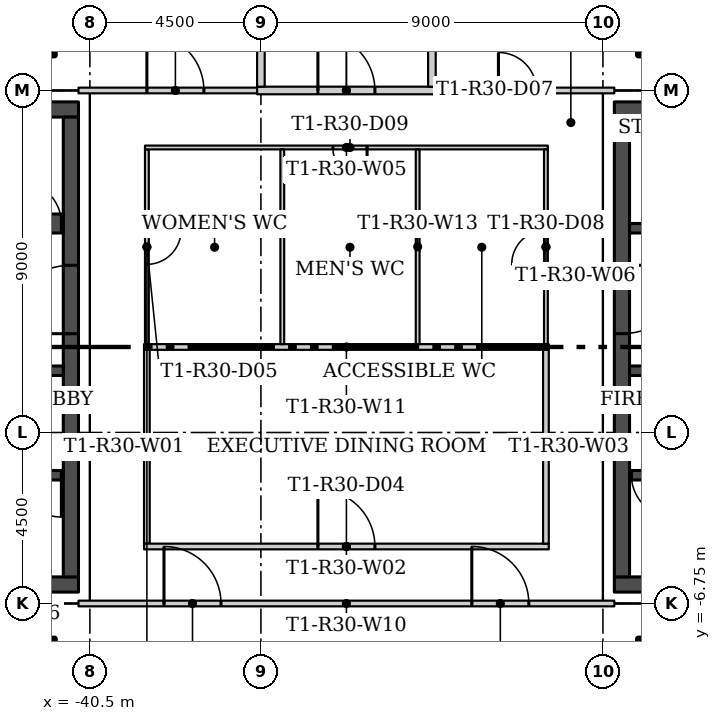
"""IFC4 building model, lengths in metres.
Left out: names, types, materials, properties, quantities, classifications, styles, units other than length and angle.
Written with IfcOpenShell. Run it as: python <this file> out.ifc"""

import sys

from ifc_helpers import new_model, si_unit, direction, frame, frame_2d, origin, origin_2d, place, context, subcontext, project, spatial, rectangle, hollow_rectangle, extrude, element, fill, save


model = new_model("IFC4")
c1 = context("Model", 3, precision=1e-05, world=origin(), true_north=direction((0.0, 1.0)))
c2 = subcontext(c1, "Body", "Model", "MODEL_VIEW")
j1 = project(units=[si_unit("LENGTHUNIT", "METRE"), si_unit("PLANEANGLEUNIT", "RADIAN")], contexts=[c1])
p1 = place(None, origin())
s1 = spatial("IfcSite", under=j1, at=p1, CompositionType="ELEMENT")
p2 = place(p1, origin())
s2 = spatial("IfcBuilding", under=s1, at=p2, CompositionType="ELEMENT")
p3 = place(p2, frame((0.0, 0.0, 269.4)))
s3 = spatial("IfcBuildingStorey", under=s2, at=p3, CompositionType="ELEMENT", Elevation=269.4)
for number, where in (
    (1, (-25.625, 8.125, 0.0)),
    (2, (-25.625, -8.125, 0.0)),
    (3, (-41.875, 8.125, 0.0)),
    (4, (-41.875, -8.125, 0.0)),
):
    element("IfcColumn", number, at=place(p3, frame(where)), inside=s3, PredefinedType="COLUMN", context=c2, shape_type="SweptSolid", body=[
        extrude(hollow_rectangle(XDim=0.9, YDim=0.9, WallThickness=0.036, at=origin_2d()), origin(), (0.0, 0.0, 1.0), 3.45),
    ])
p4 = place(p3, frame((-39.0, -0.075, 0.0), z_axis=(0.0, 0.0, 1.0), x_axis=(0.0, -1.0, 0.0)))
e5 = element("IfcWall", 5, at=p4, inside=s3, PredefinedType="PARTITIONING", context=c2, shape_type="SweptSolid", body=[
    extrude(rectangle(XDim=5.1, YDim=0.15, at=frame_2d((2.55, 0.0))), origin(), (0.0, 0.0, 1.0), 3.45),
])
p5 = place(p3, frame((-39.075, -5.25, 0.0)))
e6 = element("IfcWall", 6, at=p5, inside=s3, PredefinedType="PARTITIONING", context=c2, shape_type="SweptSolid", body=[
    extrude(rectangle(XDim=10.65, YDim=0.15, at=frame_2d((5.325, 0.0))), origin(), (0.0, 0.0, 1.0), 3.45),
])
p6 = place(p5, frame((4.575, 0.0, 0.0)))
e7 = element("IfcOpeningElement", 7, at=p6, cuts=e6, PredefinedType="OPENING", context=c2, shape_type="SweptSolid", body=[
    extrude(rectangle(XDim=1.5, YDim=2.1, at=frame_2d((0.75, 1.05))), frame((0.0, 0.085, 0.0), z_axis=(0.0, -1.0, 0.0), x_axis=(1.0, 0.0, 0.0)), (0.0, 0.0, 1.0), 0.17),
])
p7 = place(p3, frame((-28.5, -5.175, 0.0), z_axis=(0.0, 0.0, 1.0), x_axis=(0.0, 1.0, 0.0)))
e8 = element("IfcWall", 8, at=p7, inside=s3, PredefinedType="PARTITIONING", context=c2, shape_type="SweptSolid", body=[
    extrude(rectangle(XDim=5.1, YDim=0.15, at=frame_2d((2.55, 0.0))), origin(), (0.0, 0.0, 1.0), 3.45),
])
p8 = place(p3, frame((-39.0, 5.2, 0.0), z_axis=(0.0, 0.0, 1.0), x_axis=(0.0, -1.0, 0.0)))
e9 = element("IfcWall", 9, at=p8, inside=s3, PredefinedType="PARTITIONING", context=c2, shape_type="SweptSolid", body=[
    extrude(rectangle(XDim=5.125, YDim=0.1, at=frame_2d((2.562, 0.0))), origin(), (0.0, 0.0, 1.0), 3.45),
])
p9 = place(p8, frame((2.125, 0.0, 0.0)))
e10 = element("IfcOpeningElement", 10, at=p9, cuts=e9, PredefinedType="OPENING", context=c2, shape_type="SweptSolid", body=[
    extrude(rectangle(XDim=0.9, YDim=2.1, at=frame_2d((0.45, 1.05))), frame((0.0, 0.06, 0.0), z_axis=(0.0, -1.0, 0.0), x_axis=(1.0, 0.0, 0.0)), (0.0, 0.0, 1.0), 0.12),
])
p10 = place(p3, frame((-28.45, 5.25, 0.0), z_axis=(0.0, 0.0, 1.0), x_axis=(-1.0, 0.0, 0.0)))
e11 = element("IfcWall", 11, at=p10, inside=s3, PredefinedType="PARTITIONING", context=c2, shape_type="SweptSolid", body=[
    extrude(rectangle(XDim=10.6, YDim=0.1, at=frame_2d((5.3, 0.0))), origin(), (0.0, 0.0, 1.0), 3.45),
])
p11 = place(p10, frame((4.756, 0.0, 0.0)))
e12 = element("IfcOpeningElement", 12, at=p11, cuts=e11, PredefinedType="OPENING", context=c2, shape_type="SweptSolid", body=[
    extrude(rectangle(XDim=0.9, YDim=2.1, at=frame_2d((0.45, 1.05))), frame((0.0, 0.06, 0.0), z_axis=(0.0, -1.0, 0.0), x_axis=(1.0, 0.0, 0.0)), (0.0, 0.0, 1.0), 0.12),
])
p12 = place(p3, frame((-28.5, 0.075, 0.0), z_axis=(0.0, 0.0, 1.0), x_axis=(0.0, 1.0, 0.0)))
e13 = element("IfcWall", 13, at=p12, inside=s3, PredefinedType="PARTITIONING", context=c2, shape_type="SweptSolid", body=[
    extrude(rectangle(XDim=5.125, YDim=0.1, at=frame_2d((2.562, 0.0))), origin(), (0.0, 0.0, 1.0), 3.45),
])
p13 = place(p12, frame((2.1, 0.0, 0.0)))
e14 = element("IfcOpeningElement", 14, at=p13, cuts=e13, PredefinedType="OPENING", context=c2, shape_type="SweptSolid", body=[
    extrude(rectangle(XDim=0.9, YDim=2.1, at=frame_2d((0.45, 1.05))), frame((0.0, 0.06, 0.0), z_axis=(0.0, -1.0, 0.0), x_axis=(1.0, 0.0, 0.0)), (0.0, 0.0, 1.0), 0.12),
])
p14 = place(p3, frame((-40.8, 6.75, 0.0)))
e15 = element("IfcWall", 15, at=p14, inside=s3, PredefinedType="PARTITIONING", context=c2, shape_type="SweptSolid", body=[
    extrude(rectangle(XDim=4.9, YDim=0.15, at=frame_2d((2.45, 0.0))), origin(), (0.0, 0.0, 1.0), 3.45),
])
p15 = place(p14, frame((1.8, 0.0, 0.0)))
e16 = element("IfcOpeningElement", 16, at=p15, cuts=e15, PredefinedType="OPENING", context=c2, shape_type="SweptSolid", body=[
    extrude(rectangle(XDim=1.5, YDim=2.1, at=frame_2d((0.75, 1.05))), frame((0.0, 0.085, 0.0), z_axis=(0.0, -1.0, 0.0), x_axis=(1.0, 0.0, 0.0)), (0.0, 0.0, 1.0), 0.17),
])
p16 = place(p3, frame((-31.6, 6.75, 0.0)))
e17 = element("IfcWall", 17, at=p16, inside=s3, PredefinedType="PARTITIONING", context=c2, shape_type="SweptSolid", body=[
    extrude(rectangle(XDim=4.9, YDim=0.15, at=frame_2d((2.45, 0.0))), origin(), (0.0, 0.0, 1.0), 3.45),
])
p17 = place(p16, frame((1.85, 0.0, 0.0)))
e18 = element("IfcOpeningElement", 18, at=p17, cuts=e17, PredefinedType="OPENING", context=c2, shape_type="SweptSolid", body=[
    extrude(rectangle(XDim=1.0, YDim=2.4, at=frame_2d((0.5, 1.2))), frame((0.0, 0.085, 0.0), z_axis=(0.0, -1.0, 0.0), x_axis=(1.0, 0.0, 0.0)), (0.0, 0.0, 1.0), 0.17),
])
p18 = place(p3, frame((-36.1, 6.75, 0.0)))
e19 = element("IfcWall", 19, at=p18, inside=s3, PredefinedType="PARTITIONING", context=c2, shape_type="SweptSolid", body=[
    extrude(rectangle(XDim=4.7, YDim=0.2, at=frame_2d((2.35, 0.0))), origin(), (0.0, 0.0, 1.0), 3.45),
])
p19 = place(p18, frame((1.6, 0.0, 0.0)))
e20 = element("IfcOpeningElement", 20, at=p19, cuts=e19, PredefinedType="OPENING", context=c2, shape_type="SweptSolid", body=[
    extrude(rectangle(XDim=1.5, YDim=2.4, at=frame_2d((0.75, 1.2))), frame((0.0, 0.11, 0.0), z_axis=(0.0, -1.0, 0.0), x_axis=(1.0, 0.0, 0.0)), (0.0, 0.0, 1.0), 0.22),
])
p20 = place(p3, frame((-40.8, -6.75, 0.0)))
e21 = element("IfcWall", 21, at=p20, inside=s3, PredefinedType="PARTITIONING", context=c2, shape_type="SweptSolid", body=[
    extrude(rectangle(XDim=14.1, YDim=0.15, at=frame_2d((7.05, 0.0))), origin(), (0.0, 0.0, 1.0), 3.45),
])
p21 = place(p20, frame((2.25, 0.0, 0.0)))
e22 = element("IfcOpeningElement", 22, at=p21, cuts=e21, PredefinedType="OPENING", context=c2, shape_type="SweptSolid", body=[
    extrude(rectangle(XDim=1.5, YDim=2.1, at=frame_2d((0.75, 1.05))), frame((0.0, 0.085, 0.0), z_axis=(0.0, -1.0, 0.0), x_axis=(1.0, 0.0, 0.0)), (0.0, 0.0, 1.0), 0.17),
])
p22 = place(p20, frame((10.35, 0.0, 0.0)))
e23 = element("IfcOpeningElement", 23, at=p22, cuts=e21, PredefinedType="OPENING", context=c2, shape_type="SweptSolid", body=[
    extrude(rectangle(XDim=1.5, YDim=2.1, at=frame_2d((0.75, 1.05))), frame((0.0, 0.085, 0.0), z_axis=(0.0, -1.0, 0.0), x_axis=(1.0, 0.0, 0.0)), (0.0, 0.0, 1.0), 0.17),
])
p23 = place(p3, frame((-28.425, 0.0, 0.0), z_axis=(0.0, 0.0, 1.0), x_axis=(-1.0, 0.0, 0.0)))
e24 = element("IfcWall", 24, at=p23, inside=s3, PredefinedType="PARTITIONING", context=c2, shape_type="SweptSolid", body=[
    extrude(rectangle(XDim=10.65, YDim=0.15, at=frame_2d((5.325, 0.0))), origin(), (0.0, 0.0, 1.0), 3.45),
])
for number, where, z_axis, x_axis in (
    (25, (-35.438, 0.075, 0.0), (0.0, 0.0, 1.0), (0.0, 1.0, 0.0)),
    (26, (-31.875, 0.075, 0.0), (0.0, 0.0, 1.0), (0.0, 1.0, 0.0)),
):
    element("IfcWall", number, at=place(p3, frame(where, z_axis=z_axis, x_axis=x_axis)), inside=s3, PredefinedType="PARTITIONING", context=c2, shape_type="SweptSolid", body=[
        extrude(rectangle(XDim=5.125, YDim=0.1, at=frame_2d((2.562, 0.0))), origin(), (0.0, 0.0, 1.0), 3.45),
    ])
for number, where, z_axis, x_axis in (
    (27, (-36.0, 6.85, 0.0), (0.0, 0.0, 1.0), (0.0, 1.0, 0.0)),
    (28, (-31.5, 6.85, 0.0), (0.0, 0.0, 1.0), (0.0, 1.0, 0.0)),
):
    element("IfcWall", number, at=place(p3, frame(where, z_axis=z_axis, x_axis=x_axis)), inside=s3, PredefinedType="PARTITIONING", context=c2, shape_type="SweptSolid", body=[
        extrude(rectangle(XDim=8.805, YDim=0.2, at=frame_2d((4.402, 0.0))), origin(), (0.0, 0.0, 1.0), 3.45),
    ])
for number, where in (
    (29, (-26.7, -6.25, 0.0)),
    (30, (-26.7, 6.25, 0.0)),
):
    element("IfcWall", number, at=place(p3, frame(where)), inside=s3, PredefinedType="SHEAR", context=c2, shape_type="SweptSolid", body=[
        extrude(rectangle(XDim=12.9, YDim=0.4, at=frame_2d((6.45, 0.0))), origin(), (0.0, 0.0, 1.0), 3.45),
    ])
p24 = place(p3, frame((-26.5, 6.05, 0.0), z_axis=(0.0, 0.0, 1.0), x_axis=(0.0, -1.0, 0.0)))
e31 = element("IfcWall", 31, at=p24, inside=s3, PredefinedType="SHEAR", context=c2, shape_type="SweptSolid", body=[
    extrude(rectangle(XDim=12.1, YDim=0.4, at=frame_2d((6.05, 0.0))), origin(), (0.0, 0.0, 1.0), 3.45),
])
p25 = place(p24, frame((3.9, 0.0, 0.0)))
e32 = element("IfcOpeningElement", 32, at=p25, cuts=e31, PredefinedType="OPENING", context=c2, shape_type="SweptSolid", body=[
    extrude(rectangle(XDim=1.8, YDim=2.4, at=frame_2d((0.9, 1.2))), frame((0.0, 0.21, 0.0), z_axis=(0.0, -1.0, 0.0), x_axis=(1.0, 0.0, 0.0)), (0.0, 0.0, 1.0), 0.42),
])
p26 = place(p3, frame((-14.2, -3.375, 0.0), z_axis=(0.0, 0.0, 1.0), x_axis=(-1.0, 0.0, 0.0)))
e33 = element("IfcWall", 33, at=p26, inside=s3, PredefinedType="SHEAR", context=c2, shape_type="SweptSolid", body=[
    extrude(rectangle(XDim=12.1, YDim=0.25, at=frame_2d((6.05, 0.0))), origin(), (0.0, 0.0, 1.0), 3.45),
])
p27 = place(p26, frame((10.95, 0.0, 0.0)))
e34 = element("IfcOpeningElement", 34, at=p27, cuts=e33, PredefinedType="OPENING", context=c2, shape_type="SweptSolid", body=[
    extrude(rectangle(XDim=1.1, YDim=2.1, at=frame_2d((0.55, 1.05))), frame((0.0, 0.135, 0.0), z_axis=(0.0, -1.0, 0.0), x_axis=(1.0, 0.0, 0.0)), (0.0, 0.0, 1.0), 0.27),
])
p28 = place(p3, frame((-14.2, -0.625, 0.0), z_axis=(0.0, 0.0, 1.0), x_axis=(-1.0, 0.0, 0.0)))
e35 = element("IfcWall", 35, at=p28, inside=s3, PredefinedType="SHEAR", context=c2, shape_type="SweptSolid", body=[
    extrude(rectangle(XDim=12.1, YDim=0.25, at=frame_2d((6.05, 0.0))), origin(), (0.0, 0.0, 1.0), 3.45),
])
p29 = place(p28, frame((8.65, 0.0, 0.0)))
e36 = element("IfcOpeningElement", 36, at=p29, cuts=e35, PredefinedType="OPENING", context=c2, shape_type="SweptSolid", body=[
    extrude(rectangle(XDim=1.2, YDim=2.1, at=frame_2d((0.6, 1.05))), frame((0.0, 0.135, 0.0), z_axis=(0.0, -1.0, 0.0), x_axis=(1.0, 0.0, 0.0)), (0.0, 0.0, 1.0), 0.27),
])
p30 = place(p28, frame((1.7, 0.0, 0.0)))
e37 = element("IfcOpeningElement", 37, at=p30, cuts=e35, PredefinedType="OPENING", context=c2, shape_type="SweptSolid", body=[
    extrude(rectangle(XDim=0.9, YDim=2.1, at=frame_2d((0.45, 1.05))), frame((0.0, 0.135, 0.0), z_axis=(0.0, -1.0, 0.0), x_axis=(1.0, 0.0, 0.0)), (0.0, 0.0, 1.0), 0.27),
])
p31 = place(p28, frame((0.075, 0.0, 0.0)))
e38 = element("IfcOpeningElement", 38, at=p31, cuts=e35, PredefinedType="OPENING", context=c2, shape_type="SweptSolid", body=[
    extrude(rectangle(XDim=0.9, YDim=2.1, at=frame_2d((0.45, 1.05))), frame((0.0, 0.135, 0.0), z_axis=(0.0, -1.0, 0.0), x_axis=(1.0, 0.0, 0.0)), (0.0, 0.0, 1.0), 0.27),
])
p32 = place(p3, frame((-26.3, 3.125, 0.0)))
e39 = element("IfcWall", 39, at=p32, inside=s3, PredefinedType="SHEAR", context=c2, shape_type="SweptSolid", body=[
    extrude(rectangle(XDim=12.1, YDim=0.25, at=frame_2d((6.05, 0.0))), origin(), (0.0, 0.0, 1.0), 3.45),
])
p33 = place(p32, frame((6.95, 0.0, 0.0)))
e40 = element("IfcOpeningElement", 40, at=p33, cuts=e39, PredefinedType="OPENING", context=c2, shape_type="SweptSolid", body=[
    extrude(rectangle(XDim=1.1, YDim=2.1, at=frame_2d((0.55, 1.05))), frame((0.0, 0.135, 0.0), z_axis=(0.0, -1.0, 0.0), x_axis=(1.0, 0.0, 0.0)), (0.0, 0.0, 1.0), 0.27),
])
p34 = place(p32, frame((10.075, 0.0, 0.0)))
e41 = element("IfcOpeningElement", 41, at=p34, cuts=e39, PredefinedType="OPENING", context=c2, shape_type="SweptSolid", body=[
    extrude(rectangle(XDim=1.1, YDim=2.1, at=frame_2d((0.55, 1.05))), frame((0.0, 0.135, 0.0), z_axis=(0.0, -1.0, 0.0), x_axis=(1.0, 0.0, 0.0)), (0.0, 0.0, 1.0), 0.27),
])
p35 = place(p32, frame((1.55, 0.0, 0.0)))
e42 = element("IfcOpeningElement", 42, at=p35, cuts=e39, PredefinedType="OPENING", context=c2, shape_type="SweptSolid", body=[
    extrude(rectangle(XDim=0.9, YDim=2.1, at=frame_2d((0.45, 1.05))), frame((0.0, 0.135, 0.0), z_axis=(0.0, -1.0, 0.0), x_axis=(1.0, 0.0, 0.0)), (0.0, 0.0, 1.0), 0.27),
])
p36 = place(p32, frame((4.475, 0.0, 0.0)))
e43 = element("IfcOpeningElement", 43, at=p36, cuts=e39, PredefinedType="OPENING", context=c2, shape_type="SweptSolid", body=[
    extrude(rectangle(XDim=0.9, YDim=2.1, at=frame_2d((0.45, 1.05))), frame((0.0, 0.135, 0.0), z_axis=(0.0, -1.0, 0.0), x_axis=(1.0, 0.0, 0.0)), (0.0, 0.0, 1.0), 0.27),
])
for number, where, z_axis, x_axis in (
    (44, (-40.8, -6.25, 0.0), (0.0, 0.0, 1.0), (-1.0, 0.0, 0.0)),
    (45, (-40.8, 6.25, 0.0), (0.0, 0.0, 1.0), (-1.0, 0.0, 0.0)),
):
    element("IfcWall", number, at=place(p3, frame(where, z_axis=z_axis, x_axis=x_axis)), inside=s3, PredefinedType="SHEAR", context=c2, shape_type="SweptSolid", body=[
        extrude(rectangle(XDim=12.9, YDim=0.4, at=frame_2d((6.45, 0.0))), origin(), (0.0, 0.0, 1.0), 3.45),
    ])
p37 = place(p3, frame((-41.0, -6.05, 0.0), z_axis=(0.0, 0.0, 1.0), x_axis=(0.0, 1.0, 0.0)))
e46 = element("IfcWall", 46, at=p37, inside=s3, PredefinedType="SHEAR", context=c2, shape_type="SweptSolid", body=[
    extrude(rectangle(XDim=12.1, YDim=0.4, at=frame_2d((6.05, 0.0))), origin(), (0.0, 0.0, 1.0), 3.45),
])
p38 = place(p37, frame((6.4, 0.0, 0.0)))
e47 = element("IfcOpeningElement", 47, at=p38, cuts=e46, PredefinedType="OPENING", context=c2, shape_type="SweptSolid", body=[
    extrude(rectangle(XDim=1.8, YDim=2.4, at=frame_2d((0.9, 1.2))), frame((0.0, 0.21, 0.0), z_axis=(0.0, -1.0, 0.0), x_axis=(1.0, 0.0, 0.0)), (0.0, 0.0, 1.0), 0.42),
])
p39 = place(p3, frame((-41.2, -3.375, 0.0), z_axis=(0.0, 0.0, 1.0), x_axis=(-1.0, 0.0, 0.0)))
e48 = element("IfcWall", 48, at=p39, inside=s3, PredefinedType="SHEAR", context=c2, shape_type="SweptSolid", body=[
    extrude(rectangle(XDim=12.1, YDim=0.25, at=frame_2d((6.05, 0.0))), origin(), (0.0, 0.0, 1.0), 3.45),
])
p40 = place(p39, frame((0.05, 0.0, 0.0)))
e49 = element("IfcOpeningElement", 49, at=p40, cuts=e48, PredefinedType="OPENING", context=c2, shape_type="SweptSolid", body=[
    extrude(rectangle(XDim=1.1, YDim=2.1, at=frame_2d((0.55, 1.05))), frame((0.0, 0.135, 0.0), z_axis=(0.0, -1.0, 0.0), x_axis=(1.0, 0.0, 0.0)), (0.0, 0.0, 1.0), 0.27),
])
p41 = place(p3, frame((-41.2, -0.625, 0.0), z_axis=(0.0, 0.0, 1.0), x_axis=(-1.0, 0.0, 0.0)))
e50 = element("IfcWall", 50, at=p41, inside=s3, PredefinedType="SHEAR", context=c2, shape_type="SweptSolid", body=[
    extrude(rectangle(XDim=12.1, YDim=0.25, at=frame_2d((6.05, 0.0))), origin(), (0.0, 0.0, 1.0), 3.45),
])
p42 = place(p41, frame((2.25, 0.0, 0.0)))
e51 = element("IfcOpeningElement", 51, at=p42, cuts=e50, PredefinedType="OPENING", context=c2, shape_type="SweptSolid", body=[
    extrude(rectangle(XDim=1.2, YDim=2.1, at=frame_2d((0.6, 1.05))), frame((0.0, 0.135, 0.0), z_axis=(0.0, -1.0, 0.0), x_axis=(1.0, 0.0, 0.0)), (0.0, 0.0, 1.0), 0.27),
])
p43 = place(p41, frame((10.025, 0.0, 0.0)))
e52 = element("IfcOpeningElement", 52, at=p43, cuts=e50, PredefinedType="OPENING", context=c2, shape_type="SweptSolid", body=[
    extrude(rectangle(XDim=0.9, YDim=2.1, at=frame_2d((0.45, 1.05))), frame((0.0, 0.135, 0.0), z_axis=(0.0, -1.0, 0.0), x_axis=(1.0, 0.0, 0.0)), (0.0, 0.0, 1.0), 0.27),
])
p44 = place(p3, frame((-48.5, 3.25, 0.0)))
e53 = element("IfcWall", 53, at=p44, inside=s3, PredefinedType="SHEAR", context=c2, shape_type="SweptSolid", body=[
    extrude(rectangle(XDim=7.3, YDim=0.5, at=frame_2d((3.65, 0.0))), origin(), (0.0, 0.0, 1.0), 3.45),
])
p45 = place(p44, frame((6.15, 0.0, 0.0)))
e54 = element("IfcOpeningElement", 54, at=p45, cuts=e53, PredefinedType="OPENING", context=c2, shape_type="SweptSolid", body=[
    extrude(rectangle(XDim=1.1, YDim=2.1, at=frame_2d((0.55, 1.05))), frame((0.0, 0.26, 0.0), z_axis=(0.0, -1.0, 0.0), x_axis=(1.0, 0.0, 0.0)), (0.0, 0.0, 1.0), 0.52),
])
p46 = place(p21, origin())
e55 = element("IfcDoor", 55, at=p46, inside=s3, OperationType="DOUBLE_DOOR_SINGLE_SWING", PredefinedType="DOOR", context=c2, shape_type="SweptSolid", body=[
    extrude(rectangle(XDim=1.5, YDim=2.1, at=frame_2d((0.75, 1.05))), frame((0.0, 0.025, 0.0), z_axis=(0.0, -1.0, 0.0), x_axis=(1.0, 0.0, 0.0)), (0.0, 0.0, 1.0), 0.05),
])
fill(e22, e55)
p47 = place(p22, origin())
e56 = element("IfcDoor", 56, at=p47, inside=s3, OperationType="DOUBLE_DOOR_SINGLE_SWING", PredefinedType="DOOR", context=c2, shape_type="SweptSolid", body=[
    extrude(rectangle(XDim=1.5, YDim=2.1, at=frame_2d((0.75, 1.05))), frame((0.0, 0.025, 0.0), z_axis=(0.0, -1.0, 0.0), x_axis=(1.0, 0.0, 0.0)), (0.0, 0.0, 1.0), 0.05),
])
fill(e23, e56)
p48 = place(p15, origin())
e57 = element("IfcDoor", 57, at=p48, inside=s3, OperationType="DOUBLE_DOOR_SINGLE_SWING", PredefinedType="DOOR", context=c2, shape_type="SweptSolid", body=[
    extrude(rectangle(XDim=1.5, YDim=2.1, at=frame_2d((0.75, 1.05))), frame((0.0, 0.025, 0.0), z_axis=(0.0, -1.0, 0.0), x_axis=(1.0, 0.0, 0.0)), (0.0, 0.0, 1.0), 0.05),
])
fill(e16, e57)
p49 = place(p6, origin())
e58 = element("IfcDoor", 58, at=p49, inside=s3, OperationType="DOUBLE_DOOR_SINGLE_SWING", PredefinedType="DOOR", context=c2, shape_type="SweptSolid", body=[
    extrude(rectangle(XDim=1.5, YDim=2.1, at=frame_2d((0.75, 1.05))), frame((0.0, 0.025, 0.0), z_axis=(0.0, -1.0, 0.0), x_axis=(1.0, 0.0, 0.0)), (0.0, 0.0, 1.0), 0.05),
])
fill(e7, e58)
p50 = place(p9, origin())
e59 = element("IfcDoor", 59, at=p50, inside=s3, OperationType="SINGLE_SWING_LEFT", PredefinedType="DOOR", context=c2, shape_type="SweptSolid", body=[
    extrude(rectangle(XDim=0.9, YDim=2.1, at=frame_2d((0.45, 1.05))), frame((0.0, 0.025, 0.0), z_axis=(0.0, -1.0, 0.0), x_axis=(1.0, 0.0, 0.0)), (0.0, 0.0, 1.0), 0.05),
])
fill(e10, e59)
p51 = place(p19, origin())
e60 = element("IfcDoor", 60, at=p51, inside=s3, OperationType="DOUBLE_DOOR_SINGLE_SWING", PredefinedType="DOOR", context=c2, shape_type="SweptSolid", body=[
    extrude(rectangle(XDim=1.5, YDim=2.4, at=frame_2d((0.75, 1.2))), frame((0.0, 0.025, 0.0), z_axis=(0.0, -1.0, 0.0), x_axis=(1.0, 0.0, 0.0)), (0.0, 0.0, 1.0), 0.05),
])
fill(e20, e60)
p52 = place(p17, origin())
e61 = element("IfcDoor", 61, at=p52, inside=s3, OperationType="SINGLE_SWING_RIGHT", PredefinedType="DOOR", context=c2, shape_type="SweptSolid", body=[
    extrude(rectangle(XDim=1.0, YDim=2.4, at=frame_2d((0.5, 1.2))), frame((0.0, 0.025, 0.0), z_axis=(0.0, -1.0, 0.0), x_axis=(1.0, 0.0, 0.0)), (0.0, 0.0, 1.0), 0.05),
])
fill(e18, e61)
p53 = place(p13, origin())
e62 = element("IfcDoor", 62, at=p53, inside=s3, OperationType="SINGLE_SWING_RIGHT", PredefinedType="DOOR", context=c2, shape_type="SweptSolid", body=[
    extrude(rectangle(XDim=0.9, YDim=2.1, at=frame_2d((0.45, 1.05))), frame((0.0, 0.025, 0.0), z_axis=(0.0, -1.0, 0.0), x_axis=(1.0, 0.0, 0.0)), (0.0, 0.0, 1.0), 0.05),
])
fill(e14, e62)
p54 = place(p11, origin())
e63 = element("IfcDoor", 63, at=p54, inside=s3, OperationType="SINGLE_SWING_LEFT", PredefinedType="DOOR", context=c2, shape_type="SweptSolid", body=[
    extrude(rectangle(XDim=0.9, YDim=2.1, at=frame_2d((0.45, 1.05))), frame((0.0, 0.025, 0.0), z_axis=(0.0, -1.0, 0.0), x_axis=(1.0, 0.0, 0.0)), (0.0, 0.0, 1.0), 0.05),
])
fill(e12, e63)
p55 = place(p25, origin())
e64 = element("IfcDoor", 64, at=p55, inside=s3, OperationType="DOUBLE_DOOR_SINGLE_SWING", PredefinedType="DOOR", context=c2, shape_type="SweptSolid", body=[
    extrude(rectangle(XDim=1.8, YDim=2.4, at=frame_2d((0.9, 1.2))), frame((0.0, 0.025, 0.0), z_axis=(0.0, -1.0, 0.0), x_axis=(1.0, 0.0, 0.0)), (0.0, 0.0, 1.0), 0.05),
])
fill(e32, e64)
p56 = place(p27, origin())
e65 = element("IfcDoor", 65, at=p56, inside=s3, OperationType="SINGLE_SWING_RIGHT", PredefinedType="DOOR", context=c2, shape_type="SweptSolid", body=[
    extrude(rectangle(XDim=1.1, YDim=2.1, at=frame_2d((0.55, 1.05))), frame((0.0, 0.025, 0.0), z_axis=(0.0, -1.0, 0.0), x_axis=(1.0, 0.0, 0.0)), (0.0, 0.0, 1.0), 0.05),
])
fill(e34, e65)
p57 = place(p38, origin())
e66 = element("IfcDoor", 66, at=p57, inside=s3, OperationType="DOUBLE_DOOR_SINGLE_SWING", PredefinedType="DOOR", context=c2, shape_type="SweptSolid", body=[
    extrude(rectangle(XDim=1.8, YDim=2.4, at=frame_2d((0.9, 1.2))), frame((0.0, 0.025, 0.0), z_axis=(0.0, -1.0, 0.0), x_axis=(1.0, 0.0, 0.0)), (0.0, 0.0, 1.0), 0.05),
])
fill(e47, e66)
p58 = place(p40, origin())
e67 = element("IfcDoor", 67, at=p58, inside=s3, OperationType="SINGLE_SWING_LEFT", PredefinedType="DOOR", context=c2, shape_type="SweptSolid", body=[
    extrude(rectangle(XDim=1.1, YDim=2.1, at=frame_2d((0.55, 1.05))), frame((0.0, 0.025, 0.0), z_axis=(0.0, -1.0, 0.0), x_axis=(1.0, 0.0, 0.0)), (0.0, 0.0, 1.0), 0.05),
])
fill(e49, e67)
p59 = place(p45, origin())
e68 = element("IfcDoor", 68, at=p59, inside=s3, OperationType="SINGLE_SWING_RIGHT", PredefinedType="DOOR", context=c2, shape_type="SweptSolid", body=[
    extrude(rectangle(XDim=1.1, YDim=2.1, at=frame_2d((0.55, 1.05))), frame((0.0, 0.025, 0.0), z_axis=(0.0, -1.0, 0.0), x_axis=(1.0, 0.0, 0.0)), (0.0, 0.0, 1.0), 0.05),
])
fill(e54, e68)
save(model, sys.argv[1])
